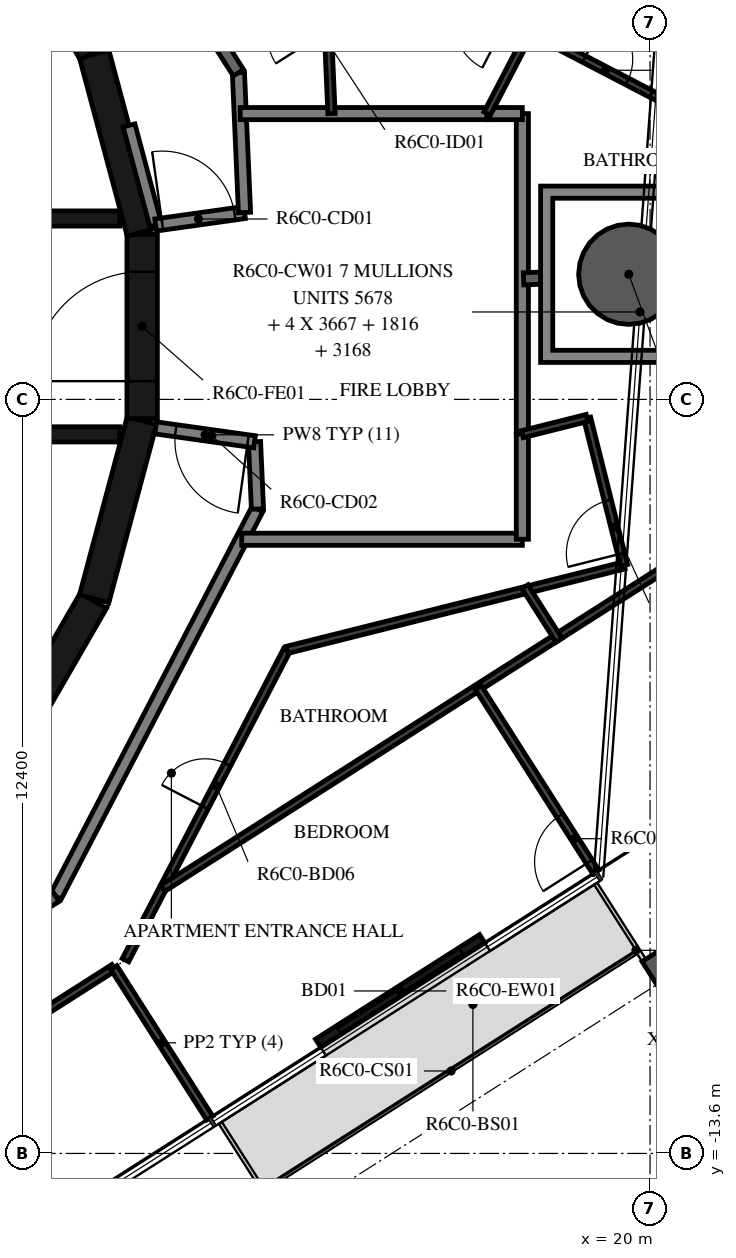
"""IFC4 building model, lengths in metres.
Left out: names, types, materials, properties, quantities, classifications, styles, units other than length and angle.
Written with IfcOpenShell. Run it as: python <this file> out.ifc"""

import sys

from ifc_helpers import new_model, si_unit, direction, frame, frame_2d, origin, origin_2d, place, context, subcontext, project, spatial, polyline, rectangle, hollow_circle, i_section, outline, extrude, element, fill, save


model = new_model("IFC4")
c1 = context("Model", 3, precision=1e-05, world=origin(), true_north=direction((0.0, 1.0)))
c2 = subcontext(c1, "Body", "Model", "MODEL_VIEW")
j1 = project(units=[si_unit("LENGTHUNIT", "METRE"), si_unit("PLANEANGLEUNIT", "RADIAN")], contexts=[c1])
p1 = place(None, origin())
s1 = spatial("IfcSite", under=j1, at=p1, CompositionType="ELEMENT")
p2 = place(p1, origin())
s2 = spatial("IfcBuilding", under=s1, at=p2, CompositionType="ELEMENT")
p3 = place(p2, frame((0.0, 0.0, 247.7)))
s3 = spatial("IfcBuildingStorey", under=s2, at=p3, CompositionType="ELEMENT", Elevation=247.7)
p4 = place(p3, frame((19.65, 0.858, -0.38), z_axis=(0.0, 0.0, 1.0), x_axis=(1.0, 0.0, 0.0)))
e1 = element("IfcColumn", 1, at=p4, inside=s3, PredefinedType="COLUMN", context=c2, shape_type="SweptSolid", body=[
    extrude(hollow_circle(Radius=0.825, WallThickness=0.04, at=origin_2d()), origin(), (0.0, 0.0, 1.0), 3.5),
])
p5 = place(p3, frame((20.237, -10.744, -0.38), z_axis=(0.0, 0.0, 1.0), x_axis=(-0.843391139633, -0.537300088953, 0.0)))
e2 = element("IfcColumn", 2, at=p5, inside=s3, PredefinedType="COLUMN", context=c2, shape_type="SweptSolid", body=[
    extrude(i_section(OverallWidth=0.3, OverallDepth=0.9, WebThickness=0.019, FlangeThickness=0.035, FilletRadius=0.03, at=origin_2d()), origin(), (0.0, 0.0, 1.0), 3.5),
])
p6 = place(p3, frame((14.541, -11.788, 0.0), z_axis=(0.0, 0.0, 1.0), x_axis=(0.843419508298, 0.53725555653, 0.0)))
e3 = element("IfcWall", 3, at=p6, inside=s3, PredefinedType="STANDARD", context=c2, shape_type="SweptSolid", body=[
    extrude(rectangle(XDim=3.2, YDim=0.16, at=frame_2d((1.6, 0.0))), origin(), (0.0, 0.0, 1.0), 3.12),
])
p7 = place(p6, frame((0.4, 0.0, 0.0)))
e4 = element("IfcOpeningElement", 4, at=p7, cuts=e3, PredefinedType="OPENING", context=c2, shape_type="SweptSolid", body=[
    extrude(rectangle(XDim=2.4, YDim=2.4, at=frame_2d((1.2, 1.2))), frame((0.0, 0.09, 0.0), z_axis=(0.0, -1.0, 0.0), x_axis=(1.0, 0.0, 0.0)), (0.0, 0.0, 1.0), 0.18),
])
for number, where, z_axis, x_axis in (
    (5, (9.329, -7.137, 0.0), (0.0, 0.0, 1.0), (0.5, 0.866, 0.0)),
    (6, (10.858, -4.479, 0.0), (0.0, 0.0, 1.0), (0.259, 0.966, 0.0)),
):
    element("IfcWall", number, at=place(p3, frame(where, z_axis=z_axis, x_axis=x_axis)), inside=s3, PredefinedType="SHEAR", context=c2, shape_type="SweptSolid", body=[
        extrude(rectangle(XDim=3.033, YDim=0.5, at=frame_2d((1.516, 0.0))), origin(), (0.0, 0.0, 1.0), 3.12),
    ])
p8 = place(p3, frame((11.647, -1.516, 0.0), z_axis=(0.0, 0.0, 1.0), x_axis=(0.0, 1.0, 0.0)))
e7 = element("IfcWall", 7, at=p8, inside=s3, PredefinedType="SHEAR", context=c2, shape_type="SweptSolid", body=[
    extrude(rectangle(XDim=3.033, YDim=0.5, at=frame_2d((1.516, 0.0))), origin(), (0.0, 0.0, 1.0), 3.12),
])
p9 = place(p8, frame((0.616, 0.0, 0.0)))
e8 = element("IfcOpeningElement", 8, at=p9, cuts=e7, PredefinedType="OPENING", context=c2, shape_type="SweptSolid", body=[
    extrude(rectangle(XDim=1.8, YDim=2.1, at=frame_2d((0.9, 1.05))), frame((0.0, 0.26, 0.0), z_axis=(0.0, -1.0, 0.0), x_axis=(1.0, 0.0, 0.0)), (0.0, 0.0, 1.0), 0.52),
])
for number, where, z_axis, x_axis in (
    (9, (11.643, 1.55, 0.0), (0.0, 0.0, 1.0), (-0.259, 0.966, 0.0)),
    (10, (10.845, 4.51, 0.0), (0.0, 0.0, 1.0), (-0.5, 0.866, 0.0)),
):
    element("IfcWall", number, at=place(p3, frame(where, z_axis=z_axis, x_axis=x_axis)), inside=s3, PredefinedType="SHEAR", context=c2, shape_type="SweptSolid", body=[
        extrude(rectangle(XDim=3.033, YDim=0.5, at=frame_2d((1.516, 0.0))), origin(), (0.0, 0.0, 1.0), 3.12),
    ])
p10 = place(p3, frame((3.35, 1.775, 0.0), z_axis=(0.0, 0.0, 1.0), x_axis=(1.0, 0.0, 0.0)))
e11 = element("IfcWall", 11, at=p10, inside=s3, PredefinedType="SHEAR", context=c2, shape_type="SweptSolid", body=[
    extrude(rectangle(XDim=7.93, YDim=0.25, at=frame_2d((3.965, 0.0))), origin(), (0.0, 0.0, 1.0), 3.12),
])
p11 = place(p10, frame((0.35, 0.0, 0.0)))
e12 = element("IfcOpeningElement", 12, at=p11, cuts=e11, PredefinedType="OPENING", context=c2, shape_type="SweptSolid", body=[
    extrude(rectangle(XDim=1.2, YDim=2.4, at=frame_2d((0.6, 1.2))), frame((0.0, 0.135, 0.0), z_axis=(0.0, -1.0, 0.0), x_axis=(1.0, 0.0, 0.0)), (0.0, 0.0, 1.0), 0.27),
])
p12 = place(p10, frame((2.5, 0.0, 0.0)))
e13 = element("IfcOpeningElement", 13, at=p12, cuts=e11, PredefinedType="OPENING", context=c2, shape_type="SweptSolid", body=[
    extrude(rectangle(XDim=1.2, YDim=2.4, at=frame_2d((0.6, 1.2))), frame((0.0, 0.135, 0.0), z_axis=(0.0, -1.0, 0.0), x_axis=(1.0, 0.0, 0.0)), (0.0, 0.0, 1.0), 0.27),
])
p13 = place(p10, frame((4.8, 0.0, 0.0)))
e14 = element("IfcOpeningElement", 14, at=p13, cuts=e11, PredefinedType="OPENING", context=c2, shape_type="SweptSolid", body=[
    extrude(rectangle(XDim=0.9, YDim=2.1, at=frame_2d((0.45, 1.05))), frame((0.0, 0.135, 0.0), z_axis=(0.0, -1.0, 0.0), x_axis=(1.0, 0.0, 0.0)), (0.0, 0.0, 1.0), 0.27),
])
p14 = place(p3, frame((3.35, -1.775, 0.0), z_axis=(0.0, 0.0, 1.0), x_axis=(1.0, 0.0, 0.0)))
e15 = element("IfcWall", 15, at=p14, inside=s3, PredefinedType="SHEAR", context=c2, shape_type="SweptSolid", body=[
    extrude(rectangle(XDim=7.93, YDim=0.25, at=frame_2d((3.965, 0.0))), origin(), (0.0, 0.0, 1.0), 3.12),
])
p15 = place(p14, frame((0.4, 0.0, 0.0)))
e16 = element("IfcOpeningElement", 16, at=p15, cuts=e15, PredefinedType="OPENING", context=c2, shape_type="SweptSolid", body=[
    extrude(rectangle(XDim=1.1, YDim=2.4, at=frame_2d((0.55, 1.2))), frame((0.0, 0.135, 0.0), z_axis=(0.0, -1.0, 0.0), x_axis=(1.0, 0.0, 0.0)), (0.0, 0.0, 1.0), 0.27),
])
p16 = place(p14, frame((2.55, 0.0, 0.0)))
e17 = element("IfcOpeningElement", 17, at=p16, cuts=e15, PredefinedType="OPENING", context=c2, shape_type="SweptSolid", body=[
    extrude(rectangle(XDim=1.1, YDim=2.4, at=frame_2d((0.55, 1.2))), frame((0.0, 0.135, 0.0), z_axis=(0.0, -1.0, 0.0), x_axis=(1.0, 0.0, 0.0)), (0.0, 0.0, 1.0), 0.27),
])
p17 = place(p14, frame((4.7, 0.0, 0.0)))
e18 = element("IfcOpeningElement", 18, at=p17, cuts=e15, PredefinedType="OPENING", context=c2, shape_type="SweptSolid", body=[
    extrude(rectangle(XDim=1.1, YDim=2.4, at=frame_2d((0.55, 1.2))), frame((0.0, 0.135, 0.0), z_axis=(0.0, -1.0, 0.0), x_axis=(1.0, 0.0, 0.0)), (0.0, 0.0, 1.0), 0.27),
])
p18 = place(p3, frame((11.87, 1.668, 0.0), z_axis=(0.0, 0.0, 1.0), x_axis=(-0.258836880648, 0.965921047093, 0.0)))
e19 = element("IfcWall", 19, at=p18, inside=s3, PredefinedType="STANDARD", context=c2, shape_type="SweptSolid", body=[
    extrude(rectangle(XDim=1.695, YDim=0.2, at=frame_2d((0.848, 0.0))), origin(), (0.0, 0.0, 1.0), 3.12),
])
p19 = place(p3, frame((11.87, 1.668, 0.0), z_axis=(0.0, 0.0, 1.0), x_axis=(0.990267985606, 0.139173692496, 0.0)))
e20 = element("IfcWall", 20, at=p19, inside=s3, PredefinedType="STANDARD", context=c2, shape_type="SweptSolid", body=[
    extrude(rectangle(XDim=1.475, YDim=0.2, at=frame_2d((0.738, 0.0))), origin(), (0.0, 0.0, 1.0), 3.12),
])
p20 = place(p19, frame((0.11, 0.0, 0.0)))
e21 = element("IfcOpeningElement", 21, at=p20, cuts=e20, PredefinedType="OPENING", context=c2, shape_type="SweptSolid", body=[
    extrude(rectangle(XDim=1.2, YDim=2.1, at=frame_2d((0.6, 1.05))), frame((0.0, 0.11, 0.0), z_axis=(0.0, -1.0, 0.0), x_axis=(1.0, 0.0, 0.0)), (0.0, 0.0, 1.0), 0.22),
])
p21 = place(p3, frame((13.331, 1.874, 0.0), z_axis=(0.0, 0.0, 1.0), x_axis=(-0.043621457762, 0.999048131184, 0.0)))
e22 = element("IfcWall", 22, at=p21, inside=s3, PredefinedType="STANDARD", context=c2, shape_type="SweptSolid", body=[
    extrude(rectangle(XDim=2.3, YDim=0.2, at=frame_2d((1.15, 0.0))), origin(), (0.0, 0.0, 1.0), 3.12),
])
p22 = place(p3, frame((13.231, 4.172, 0.0), z_axis=(0.0, 0.0, 1.0), x_axis=(-0.537304397561, 0.843388394728, 0.0)))
e23 = element("IfcWall", 23, at=p22, inside=s3, PredefinedType="STANDARD", context=c2, shape_type="SweptSolid", body=[
    extrude(rectangle(XDim=7.181, YDim=0.2, at=frame_2d((3.59, 0.0))), origin(), (0.0, 0.0, 1.0), 3.12),
])
p23 = place(p22, frame((2.881, 0.0, 0.0)))
e24 = element("IfcOpeningElement", 24, at=p23, cuts=e23, PredefinedType="OPENING", context=c2, shape_type="SweptSolid", body=[
    extrude(rectangle(XDim=1.0, YDim=2.1, at=frame_2d((0.5, 1.05))), frame((0.0, 0.11, 0.0), z_axis=(0.0, -1.0, 0.0), x_axis=(1.0, 0.0, 0.0)), (0.0, 0.0, 1.0), 0.22),
])
p24 = place(p22, frame((5.681, 0.0, 0.0)))
e25 = element("IfcOpeningElement", 25, at=p24, cuts=e23, PredefinedType="OPENING", context=c2, shape_type="SweptSolid", body=[
    extrude(rectangle(XDim=1.0, YDim=2.1, at=frame_2d((0.5, 1.05))), frame((0.0, 0.11, 0.0), z_axis=(0.0, -1.0, 0.0), x_axis=(1.0, 0.0, 0.0)), (0.0, 0.0, 1.0), 0.22),
])
p25 = place(p3, frame((10.228, -9.372, 0.0), z_axis=(0.0, 0.0, 1.0), x_axis=(0.461759464021, 0.887005184532, 0.0)))
e26 = element("IfcWall", 26, at=p25, inside=s3, PredefinedType="STANDARD", context=c2, shape_type="SweptSolid", body=[
    extrude(rectangle(XDim=7.181, YDim=0.2, at=frame_2d((3.591, 0.0))), origin(), (0.0, 0.0, 1.0), 3.12),
])
p26 = place(p3, frame((13.544, -3.003, 0.0), z_axis=(0.0, 0.0, 1.0), x_axis=(-0.043666917606, 0.999046145234, 0.0)))
e27 = element("IfcWall", 27, at=p26, inside=s3, PredefinedType="STANDARD", context=c2, shape_type="SweptSolid", body=[
    extrude(rectangle(XDim=1.107, YDim=0.2, at=frame_2d((0.553, 0.0))), origin(), (0.0, 0.0, 1.0), 3.12),
])
p27 = place(p3, frame((13.496, -1.897, 0.0), z_axis=(0.0, 0.0, 1.0), x_axis=(-0.99026234641, 0.139213811391, 0.0)))
e28 = element("IfcWall", 28, at=p27, inside=s3, PredefinedType="STANDARD", context=c2, shape_type="SweptSolid", body=[
    extrude(rectangle(XDim=1.641, YDim=0.2, at=frame_2d((0.821, 0.0))), origin(), (0.0, 0.0, 1.0), 3.12),
])
p28 = place(p27, frame((0.11, 0.0, 0.0)))
e29 = element("IfcOpeningElement", 29, at=p28, cuts=e28, PredefinedType="OPENING", context=c2, shape_type="SweptSolid", body=[
    extrude(rectangle(XDim=1.2, YDim=2.1, at=frame_2d((0.6, 1.05))), frame((0.0, 0.11, 0.0), z_axis=(0.0, -1.0, 0.0), x_axis=(1.0, 0.0, 0.0)), (0.0, 0.0, 1.0), 0.22),
])
p29 = place(p3, frame((4.172, -13.231, 0.0), z_axis=(0.0, 0.0, 1.0), x_axis=(0.843388394728, 0.537304397561, 0.0)))
e30 = element("IfcWall", 30, at=p29, inside=s3, PredefinedType="STANDARD", context=c2, shape_type="SweptSolid", body=[
    extrude(rectangle(XDim=7.181, YDim=0.2, at=frame_2d((3.59, 0.0))), origin(), (0.0, 0.0, 1.0), 3.12),
])
p30 = place(p29, frame((0.2, 0.0, 0.0)))
e31 = element("IfcOpeningElement", 31, at=p30, cuts=e30, PredefinedType="OPENING", context=c2, shape_type="SweptSolid", body=[
    extrude(rectangle(XDim=1.0, YDim=2.1, at=frame_2d((0.5, 1.05))), frame((0.0, 0.11, 0.0), z_axis=(0.0, -1.0, 0.0), x_axis=(1.0, 0.0, 0.0)), (0.0, 0.0, 1.0), 0.22),
])
p31 = place(p3, frame((17.321, 3.5, 0.0), z_axis=(0.0, 0.0, 1.0), x_axis=(-1.0, 0.0, 0.0)))
e32 = element("IfcWall", 32, at=p31, inside=s3, PredefinedType="STANDARD", context=c2, shape_type="SweptSolid", body=[
    extrude(rectangle(XDim=4.061, YDim=0.2, at=frame_2d((2.03, 0.0))), origin(), (0.0, 0.0, 1.0), 3.12),
])
p32 = place(p3, frame((17.9, -1.772, 0.0), z_axis=(0.0, 0.0, 1.0), x_axis=(0.0, 1.0, 0.0)))
e33 = element("IfcWall", 33, at=p32, inside=s3, PredefinedType="STANDARD", context=c2, shape_type="SweptSolid", body=[
    extrude(rectangle(XDim=5.272, YDim=0.2, at=frame_2d((2.636, 0.0))), origin(), (0.0, 0.0, 1.0), 3.12),
])
p33 = place(p3, frame((17.9, 3.5, 0.0), z_axis=(0.0, 0.0, 1.0), x_axis=(-1.0, 0.0, 0.0)))
e34 = element("IfcWall", 34, at=p33, inside=s3, PredefinedType="STANDARD", context=c2, shape_type="SweptSolid", body=[
    extrude(rectangle(XDim=0.579, YDim=0.2, at=frame_2d((0.29, 0.0))), origin(), (0.0, 0.0, 1.0), 3.12),
])
p34 = place(p3, frame((13.285, -3.5, 0.0), z_axis=(0.0, 0.0, 1.0), x_axis=(1.0, 0.0, 0.0)))
e35 = element("IfcWall", 35, at=p34, inside=s3, PredefinedType="STANDARD", context=c2, shape_type="SweptSolid", body=[
    extrude(rectangle(XDim=4.615, YDim=0.2, at=frame_2d((2.308, 0.0))), origin(), (0.0, 0.0, 1.0), 3.12),
])
p35 = place(p3, frame((17.9, -3.5, 0.0), z_axis=(0.0, 0.0, 1.0), x_axis=(0.0, 1.0, 0.0)))
e36 = element("IfcWall", 36, at=p35, inside=s3, PredefinedType="STANDARD", context=c2, shape_type="SweptSolid", body=[
    extrude(rectangle(XDim=1.728, YDim=0.2, at=frame_2d((0.864, 0.0))), origin(), (0.0, 0.0, 1.0), 3.12),
])
p36 = place(p3, frame((17.92, 0.782, 0.0), z_axis=(0.0, 0.0, 1.0), x_axis=(0.999051221661, 0.04355061995, 0.0)))
e37 = element("IfcWall", 37, at=p36, inside=s3, PredefinedType="STANDARD", context=c2, shape_type="SweptSolid", body=[
    extrude(rectangle(XDim=0.28, YDim=0.2, at=frame_2d((0.14, 0.0))), origin(), (0.0, 0.0, 1.0), 3.12),
])
p37 = place(p3, frame((14.761, 3.5, 0.0), z_axis=(0.0, 0.0, 1.0), x_axis=(-0.04369750018, 0.999044808043, 0.0)))
e38 = element("IfcWall", 38, at=p37, inside=s3, PredefinedType="PARTITIONING", context=c2, shape_type="SweptSolid", body=[
    extrude(rectangle(XDim=1.14, YDim=0.12, at=frame_2d((0.57, 0.0))), origin(), (0.0, 0.0, 1.0), 3.12),
])
p38 = place(p3, frame((18.028, 4.859, 0.0), z_axis=(0.0, 0.0, 1.0), x_axis=(0.88702512027, -0.46172116695, 0.0)))
e39 = element("IfcWall", 39, at=p38, inside=s3, PredefinedType="PARTITIONING", context=c2, shape_type="SweptSolid", body=[
    extrude(rectangle(XDim=2.983, YDim=0.12, at=frame_2d((1.492, 0.0))), origin(), (0.0, 0.0, 1.0), 3.12),
])
p39 = place(p38, frame((1.0, 0.0, 0.0)))
e40 = element("IfcOpeningElement", 40, at=p39, cuts=e39, PredefinedType="OPENING", context=c2, shape_type="SweptSolid", body=[
    extrude(rectangle(XDim=0.8, YDim=2.1, at=frame_2d((0.4, 1.05))), frame((0.0, 0.07, 0.0), z_axis=(0.0, -1.0, 0.0), x_axis=(1.0, 0.0, 0.0)), (0.0, 0.0, 1.0), 0.14),
])
p40 = place(p3, frame((18.028, 4.859, 0.0), z_axis=(0.0, 0.0, 1.0), x_axis=(-0.461688901614, -0.887041914526, 0.0)))
e41 = element("IfcWall", 41, at=p40, inside=s3, PredefinedType="PARTITIONING", context=c2, shape_type="SweptSolid", body=[
    extrude(rectangle(XDim=1.532, YDim=0.12, at=frame_2d((0.766, 0.0))), origin(), (0.0, 0.0, 1.0), 3.12),
])
p41 = place(p3, frame((4.83, -14.59, 0.0), z_axis=(0.0, 0.0, 1.0), x_axis=(0.843393042763, 0.537297101629, 0.0)))
e42 = element("IfcWall", 42, at=p41, inside=s3, PredefinedType="PARTITIONING", context=c2, shape_type="SweptSolid", body=[
    extrude(rectangle(XDim=7.53, YDim=0.12, at=frame_2d((3.765, 0.0))), origin(), (0.0, 0.0, 1.0), 3.12),
])
p42 = place(p41, frame((0.2, 0.0, 0.0)))
e43 = element("IfcOpeningElement", 43, at=p42, cuts=e42, PredefinedType="OPENING", context=c2, shape_type="SweptSolid", body=[
    extrude(rectangle(XDim=0.9, YDim=2.1, at=frame_2d((0.45, 1.05))), frame((0.0, 0.07, 0.0), z_axis=(0.0, -1.0, 0.0), x_axis=(1.0, 0.0, 0.0)), (0.0, 0.0, 1.0), 0.14),
])
p43 = place(p3, frame((11.373, -10.421, 0.0), z_axis=(0.0, 0.0, 1.0), x_axis=(0.461738939635, 0.887015868869, 0.0)))
e44 = element("IfcWall", 44, at=p43, inside=s3, PredefinedType="PARTITIONING", context=c2, shape_type="SweptSolid", body=[
    extrude(rectangle(XDim=5.752, YDim=0.12, at=frame_2d((2.876, 0.0))), origin(), (0.0, 0.0, 1.0), 3.12),
])
p44 = place(p43, frame((2.831, 0.0, 0.0)))
e45 = element("IfcOpeningElement", 45, at=p44, cuts=e44, PredefinedType="OPENING", context=c2, shape_type="SweptSolid", body=[
    extrude(rectangle(XDim=0.8, YDim=2.1, at=frame_2d((0.4, 1.05))), frame((0.0, 0.07, 0.0), z_axis=(0.0, -1.0, 0.0), x_axis=(1.0, 0.0, 0.0)), (0.0, 0.0, 1.0), 0.14),
])
p45 = place(p3, frame((14.029, -5.32, 0.0), z_axis=(0.0, 0.0, 1.0), x_axis=(0.969999099814, 0.243108507378, 0.0)))
e46 = element("IfcWall", 46, at=p45, inside=s3, PredefinedType="PARTITIONING", context=c2, shape_type="SweptSolid", body=[
    extrude(rectangle(XDim=5.715, YDim=0.12, at=frame_2d((2.857, 0.0))), origin(), (0.0, 0.0, 1.0), 3.12),
])
p46 = place(p3, frame((19.573, -3.93, 0.0), z_axis=(0.0, 0.0, 1.0), x_axis=(-0.243155959183, 0.96998720585, 0.0)))
e47 = element("IfcWall", 47, at=p46, inside=s3, PredefinedType="PARTITIONING", context=c2, shape_type="SweptSolid", body=[
    extrude(rectangle(XDim=2.5, YDim=0.12, at=frame_2d((1.25, 0.0))), origin(), (0.0, 0.0, 1.0), 3.12),
])
p47 = place(p46, frame((0.2, 0.0, 0.0)))
e48 = element("IfcOpeningElement", 48, at=p47, cuts=e47, PredefinedType="OPENING", context=c2, shape_type="SweptSolid", body=[
    extrude(rectangle(XDim=0.9, YDim=2.1, at=frame_2d((0.45, 1.05))), frame((0.0, 0.07, 0.0), z_axis=(0.0, -1.0, 0.0), x_axis=(1.0, 0.0, 0.0)), (0.0, 0.0, 1.0), 0.14),
])
p48 = place(p3, frame((18.965, -1.505, 0.0), z_axis=(0.0, 0.0, 1.0), x_axis=(-0.969998406835, -0.243111272339, 0.0)))
e49 = element("IfcWall", 49, at=p48, inside=s3, PredefinedType="PARTITIONING", context=c2, shape_type="SweptSolid", body=[
    extrude(rectangle(XDim=1.098, YDim=0.12, at=frame_2d((0.549, 0.0))), origin(), (0.0, 0.0, 1.0), 3.12),
])
p49 = place(p3, frame((12.758, -13.018, 0.0), z_axis=(0.0, 0.0, 1.0), x_axis=(-0.537338423153, 0.843366716798, 0.0)))
e50 = element("IfcWall", 50, at=p49, inside=s3, PredefinedType="PARTITIONING", context=c2, shape_type="SweptSolid", body=[
    extrude(rectangle(XDim=2.934, YDim=0.12, at=frame_2d((1.467, 0.0))), origin(), (0.0, 0.0, 1.0), 2.73),
])
p50 = place(p3, frame((21.837, -2.966, 0.0), z_axis=(0.0, 0.0, 1.0), x_axis=(-0.843394529709, -0.537294767569, 0.0)))
e51 = element("IfcWall", 51, at=p50, inside=s3, PredefinedType="PARTITIONING", context=c2, shape_type="SweptSolid", body=[
    extrude(rectangle(XDim=11.678, YDim=0.12, at=frame_2d((5.839, 0.0))), origin(), (0.0, 0.0, 1.0), 3.12),
])
p51 = place(p50, frame((0.2, 0.0, 0.0)))
e52 = element("IfcOpeningElement", 52, at=p51, cuts=e51, PredefinedType="OPENING", context=c2, shape_type="SweptSolid", body=[
    extrude(rectangle(XDim=0.9, YDim=2.1, at=frame_2d((0.45, 1.05))), frame((0.0, 0.07, 0.0), z_axis=(0.0, -1.0, 0.0), x_axis=(1.0, 0.0, 0.0)), (0.0, 0.0, 1.0), 0.14),
])
p52 = place(p3, frame((19.109, -8.972, 0.0), z_axis=(0.0, 0.0, 1.0), x_axis=(-0.537318625891, 0.843379329999, 0.0)))
e53 = element("IfcWall", 53, at=p52, inside=s3, PredefinedType="PARTITIONING", context=c2, shape_type="SweptSolid", body=[
    extrude(rectangle(XDim=3.6, YDim=0.12, at=frame_2d((1.8, 0.0))), origin(), (0.0, 0.0, 1.0), 2.73),
])
p53 = place(p52, frame((0.2, 0.0, 0.0)))
e54 = element("IfcOpeningElement", 54, at=p53, cuts=e53, PredefinedType="OPENING", context=c2, shape_type="SweptSolid", body=[
    extrude(rectangle(XDim=0.9, YDim=2.1, at=frame_2d((0.45, 1.05))), frame((0.0, 0.07, 0.0), z_axis=(0.0, -1.0, 0.0), x_axis=(1.0, 0.0, 0.0)), (0.0, 0.0, 1.0), 0.14),
])
p54 = place(p3, frame((18.503, -5.161, 0.0), z_axis=(0.0, 0.0, 1.0), x_axis=(-0.537208231854, 0.843449652101, 0.0)))
e55 = element("IfcWall", 55, at=p54, inside=s3, PredefinedType="PARTITIONING", context=c2, shape_type="SweptSolid", body=[
    extrude(rectangle(XDim=1.044, YDim=0.12, at=frame_2d((0.522, 0.0))), origin(), (0.0, 0.0, 1.0), 3.12),
])
p55 = place(p3, origin())
e56 = element("IfcWall", 56, at=p55, inside=s3, PredefinedType="STANDARD", context=c2, shape_type="SweptSolid", body=[
    extrude(outline(polyline([(21.1, 2.308), (21.1, -0.592), (18.2, -0.592), (18.2, 2.308), (21.1, 2.308)]), holes=[polyline([(18.4, -0.392), (20.9, -0.392), (20.9, 2.108), (18.4, 2.108), (18.4, -0.392)])]), origin(), (0.0, 0.0, 1.0), 3.12),
])
p56 = place(p7, origin())
e57 = element("IfcDoor", 57, at=p56, inside=s3, OperationType="DOUBLE_DOOR_SLIDING", PredefinedType="DOOR", context=c2, shape_type="SweptSolid", body=[
    extrude(rectangle(XDim=2.4, YDim=2.4, at=frame_2d((1.2, 1.2))), frame((0.0, 0.025, 0.0), z_axis=(0.0, -1.0, 0.0), x_axis=(1.0, 0.0, 0.0)), (0.0, 0.0, 1.0), 0.05),
])
fill(e4, e57)
p57 = place(p9, origin())
e58 = element("IfcDoor", 58, at=p57, inside=s3, OperationType="DOUBLE_DOOR_SINGLE_SWING", PredefinedType="DOOR", context=c2, shape_type="SweptSolid", body=[
    extrude(rectangle(XDim=1.8, YDim=2.1, at=frame_2d((0.9, 1.05))), frame((0.0, 0.025, 0.0), z_axis=(0.0, -1.0, 0.0), x_axis=(1.0, 0.0, 0.0)), (0.0, 0.0, 1.0), 0.05),
])
fill(e8, e58)
p58 = place(p39, origin())
e59 = element("IfcDoor", 59, at=p58, inside=s3, OperationType="SINGLE_SWING_RIGHT", PredefinedType="DOOR", context=c2, shape_type="SweptSolid", body=[
    extrude(rectangle(XDim=0.8, YDim=2.1, at=frame_2d((0.4, 1.05))), frame((0.0, 0.025, 0.0), z_axis=(0.0, -1.0, 0.0), x_axis=(1.0, 0.0, 0.0)), (0.0, 0.0, 1.0), 0.05),
])
fill(e40, e59)
p59 = place(p44, origin())
e60 = element("IfcDoor", 60, at=p59, inside=s3, OperationType="SINGLE_SWING_RIGHT", PredefinedType="DOOR", context=c2, shape_type="SweptSolid", body=[
    extrude(rectangle(XDim=0.8, YDim=2.1, at=frame_2d((0.4, 1.05))), frame((0.0, 0.025, 0.0), z_axis=(0.0, -1.0, 0.0), x_axis=(1.0, 0.0, 0.0)), (0.0, 0.0, 1.0), 0.05),
])
fill(e45, e60)
p60 = place(p47, origin())
e61 = element("IfcDoor", 61, at=p60, inside=s3, OperationType="SINGLE_SWING_RIGHT", PredefinedType="DOOR", context=c2, shape_type="SweptSolid", body=[
    extrude(rectangle(XDim=0.9, YDim=2.1, at=frame_2d((0.45, 1.05))), frame((0.0, 0.025, 0.0), z_axis=(0.0, -1.0, 0.0), x_axis=(1.0, 0.0, 0.0)), (0.0, 0.0, 1.0), 0.05),
])
fill(e48, e61)
p61 = place(p53, origin())
e62 = element("IfcDoor", 62, at=p61, inside=s3, OperationType="SINGLE_SWING_LEFT", PredefinedType="DOOR", context=c2, shape_type="SweptSolid", body=[
    extrude(rectangle(XDim=0.9, YDim=2.1, at=frame_2d((0.45, 1.05))), frame((0.0, 0.025, 0.0), z_axis=(0.0, -1.0, 0.0), x_axis=(1.0, 0.0, 0.0)), (0.0, 0.0, 1.0), 0.05),
])
fill(e54, e62)
p62 = place(p20, origin())
e63 = element("IfcDoor", 63, at=p62, inside=s3, OperationType="DOUBLE_DOOR_SINGLE_SWING", PredefinedType="DOOR", context=c2, shape_type="SweptSolid", body=[
    extrude(rectangle(XDim=1.2, YDim=2.1, at=frame_2d((0.6, 1.05))), frame((0.0, 0.025, 0.0), z_axis=(0.0, -1.0, 0.0), x_axis=(1.0, 0.0, 0.0)), (0.0, 0.0, 1.0), 0.05),
])
fill(e21, e63)
p63 = place(p28, origin())
e64 = element("IfcDoor", 64, at=p63, inside=s3, OperationType="DOUBLE_DOOR_SINGLE_SWING", PredefinedType="DOOR", context=c2, shape_type="SweptSolid", body=[
    extrude(rectangle(XDim=1.2, YDim=2.1, at=frame_2d((0.6, 1.05))), frame((0.0, 0.025, 0.0), z_axis=(0.0, -1.0, 0.0), x_axis=(1.0, 0.0, 0.0)), (0.0, 0.0, 1.0), 0.05),
])
fill(e29, e64)
save(model, sys.argv[1])
